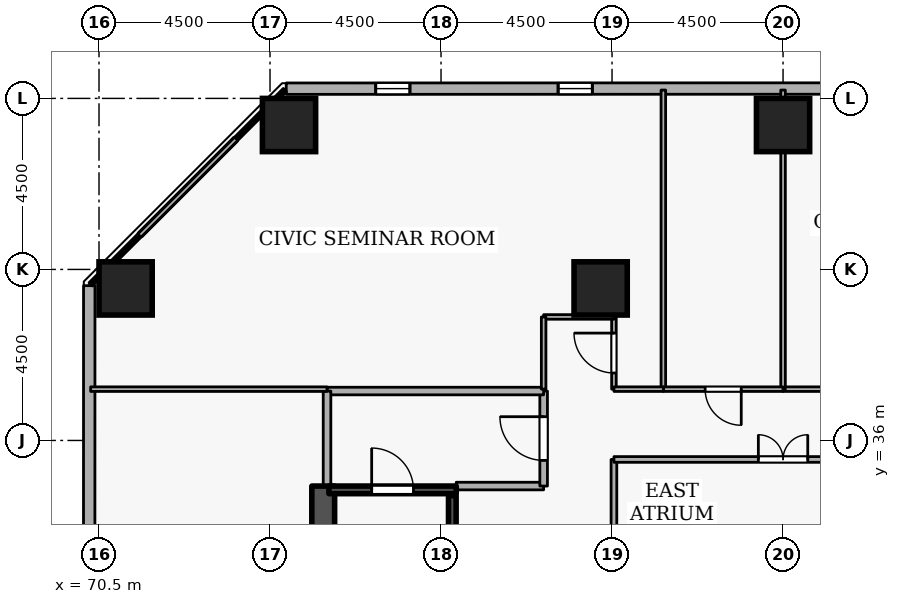
"""IFC4 building model, lengths in metres.
Left out: names, types, materials, properties, quantities, classifications, styles, units other than length and angle.
Written with IfcOpenShell. Run it as: python <this file> out.ifc"""

import sys

from ifc_helpers import new_model, si_unit, direction, frame, frame_2d, origin, origin_2d, place, context, subcontext, project, spatial, rectangle, extrude, element, fill, save


model = new_model("IFC4")
c1 = context("Model", 3, precision=1e-05, world=origin(), true_north=direction((0.0, 1.0)))
c2 = subcontext(c1, "Body", "Model", "MODEL_VIEW")
j1 = project(units=[si_unit("LENGTHUNIT", "METRE"), si_unit("PLANEANGLEUNIT", "RADIAN")], contexts=[c1])
p1 = place(None, origin())
s1 = spatial("IfcSite", under=j1, at=p1, CompositionType="ELEMENT")
p2 = place(p1, origin())
s2 = spatial("IfcBuilding", under=s1, at=p2, CompositionType="ELEMENT")
p3 = place(p2, frame((0.0, 0.0, 38.7)))
s3 = spatial("IfcBuildingStorey", under=s2, at=p3, CompositionType="ELEMENT", Elevation=38.7)
p4 = place(p3, frame((76.4, 19.2, 0.0), z_axis=(0.0, 0.0, 1.0), x_axis=(0.0, 1.0, 0.0)))
e1 = element("IfcWall", 1, at=p4, inside=s3, PredefinedType="SHEAR", context=c2, shape_type="SweptSolid", body=[
    extrude(rectangle(XDim=15.6, YDim=0.6, at=frame_2d((7.8, 0.0))), origin(), (0.0, 0.0, 1.0), 3.6),
])
for number, where, z_axis, x_axis in (
    (2, (88.5, 44.3, 0.0), (0.0, 0.0, 1.0), (1.0, 0.0, 0.0)),
    (3, (75.5, 44.3, 0.0), (0.0, 0.0, 1.0), (1.0, 0.0, 0.0)),
    (4, (71.2, 40.0, 0.0), (0.0, 0.0, 1.0), (1.0, 0.0, 0.0)),
    (5, (83.7, 40.0, 0.0), (0.0, 0.0, 1.0), (1.0, 0.0, 0.0)),
):
    element("IfcColumn", number, at=place(p3, frame(where, z_axis=z_axis, x_axis=x_axis)), inside=s3, PredefinedType="COLUMN", context=c2, shape_type="SweptSolid", body=[
        extrude(rectangle(XDim=1.4, YDim=1.4, at=origin_2d()), origin(), (0.0, 0.0, 1.0), 3.6),
    ])
p5 = place(p3, frame((110.181, 45.265, 0.0), z_axis=(0.0, 0.0, 1.0), x_axis=(-0.999999969775, -0.000245864205, 0.0)))
e6 = element("IfcWall", 6, at=p5, inside=s3, PredefinedType="STANDARD", context=c2, shape_type="SweptSolid", body=[
    extrude(rectangle(XDim=34.755, YDim=0.3, at=frame_2d((17.377, 0.0))), origin(), (0.0, 0.0, 1.0), 2.7),
])
p6 = place(p5, frame((2.7, 0.0, 0.72)))
e7 = element("IfcOpeningElement", 7, at=p6, cuts=e6, PredefinedType="OPENING", context=c2, shape_type="SweptSolid", body=[
    extrude(rectangle(XDim=0.9, YDim=1.75, at=frame_2d((0.45, 0.875))), frame((0.0, 0.16, 0.0), z_axis=(0.0, -1.0, 0.0), x_axis=(1.0, 0.0, 0.0)), (0.0, 0.0, 1.0), 0.32),
])
p7 = place(p5, frame((12.3, 0.0, 0.72)))
e8 = element("IfcOpeningElement", 8, at=p7, cuts=e6, PredefinedType="OPENING", context=c2, shape_type="SweptSolid", body=[
    extrude(rectangle(XDim=0.9, YDim=1.75, at=frame_2d((0.45, 0.875))), frame((0.0, 0.16, 0.0), z_axis=(0.0, -1.0, 0.0), x_axis=(1.0, 0.0, 0.0)), (0.0, 0.0, 1.0), 0.32),
])
p8 = place(p5, frame((17.1, 0.0, 0.72)))
e9 = element("IfcOpeningElement", 9, at=p8, cuts=e6, PredefinedType="OPENING", context=c2, shape_type="SweptSolid", body=[
    extrude(rectangle(XDim=0.9, YDim=1.75, at=frame_2d((0.45, 0.875))), frame((0.0, 0.16, 0.0), z_axis=(0.0, -1.0, 0.0), x_axis=(1.0, 0.0, 0.0)), (0.0, 0.0, 1.0), 0.32),
])
p9 = place(p5, frame((26.7, 0.0, 0.72)))
e10 = element("IfcOpeningElement", 10, at=p9, cuts=e6, PredefinedType="OPENING", context=c2, shape_type="SweptSolid", body=[
    extrude(rectangle(XDim=0.9, YDim=1.75, at=frame_2d((0.45, 0.875))), frame((0.0, 0.16, 0.0), z_axis=(0.0, -1.0, 0.0), x_axis=(1.0, 0.0, 0.0)), (0.0, 0.0, 1.0), 0.32),
])
p10 = place(p5, frame((31.5, 0.0, 0.72)))
e11 = element("IfcOpeningElement", 11, at=p10, cuts=e6, PredefinedType="OPENING", context=c2, shape_type="SweptSolid", body=[
    extrude(rectangle(XDim=0.9, YDim=1.75, at=frame_2d((0.45, 0.875))), frame((0.0, 0.16, 0.0), z_axis=(0.0, -1.0, 0.0), x_axis=(1.0, 0.0, 0.0)), (0.0, 0.0, 1.0), 0.32),
])
p11 = place(p3, frame((70.244, 40.073, 0.0), z_axis=(0.0, 0.0, 1.0), x_axis=(-0.000245864205, -0.999999969775, 0.0)))
e12 = element("IfcWall", 12, at=p11, inside=s3, PredefinedType="STANDARD", context=c2, shape_type="SweptSolid", body=[
    extrude(rectangle(XDim=34.755, YDim=0.3, at=frame_2d((17.377, 0.0))), origin(), (0.0, 0.0, 1.0), 2.7),
])
p12 = place(p11, frame((7.5, 0.0, 0.72)))
e13 = element("IfcOpeningElement", 13, at=p12, cuts=e12, PredefinedType="OPENING", context=c2, shape_type="SweptSolid", body=[
    extrude(rectangle(XDim=0.9, YDim=1.75, at=frame_2d((0.45, 0.875))), frame((0.0, 0.16, 0.0), z_axis=(0.0, -1.0, 0.0), x_axis=(1.0, 0.0, 0.0)), (0.0, 0.0, 1.0), 0.32),
])
p13 = place(p11, frame((17.1, 0.0, 0.72)))
e14 = element("IfcOpeningElement", 14, at=p13, cuts=e12, PredefinedType="OPENING", context=c2, shape_type="SweptSolid", body=[
    extrude(rectangle(XDim=0.9, YDim=1.75, at=frame_2d((0.45, 0.875))), frame((0.0, 0.16, 0.0), z_axis=(0.0, -1.0, 0.0), x_axis=(1.0, 0.0, 0.0)), (0.0, 0.0, 1.0), 0.32),
])
p14 = place(p11, frame((21.9, 0.0, 0.72)))
e15 = element("IfcOpeningElement", 15, at=p14, cuts=e12, PredefinedType="OPENING", context=c2, shape_type="SweptSolid", body=[
    extrude(rectangle(XDim=0.9, YDim=1.75, at=frame_2d((0.45, 0.875))), frame((0.0, 0.16, 0.0), z_axis=(0.0, -1.0, 0.0), x_axis=(1.0, 0.0, 0.0)), (0.0, 0.0, 1.0), 0.32),
])
p15 = place(p11, frame((31.5, 0.0, 0.72)))
e16 = element("IfcOpeningElement", 16, at=p15, cuts=e12, PredefinedType="OPENING", context=c2, shape_type="SweptSolid", body=[
    extrude(rectangle(XDim=0.9, YDim=1.75, at=frame_2d((0.45, 0.875))), frame((0.0, 0.16, 0.0), z_axis=(0.0, -1.0, 0.0), x_axis=(1.0, 0.0, 0.0)), (0.0, 0.0, 1.0), 0.32),
])
p16 = place(p3, frame((76.55, 34.7, 0.0), z_axis=(0.0, 0.0, 1.0), x_axis=(1.0, 0.0, 0.0)))
e17 = element("IfcWall", 17, at=p16, inside=s3, PredefinedType="SHEAR", context=c2, shape_type="SweptSolid", body=[
    extrude(rectangle(XDim=3.35, YDim=0.2, at=frame_2d((1.675, 0.0))), origin(), (0.0, 0.0, 1.0), 3.6),
])
p17 = place(p16, frame((1.125, 0.0, 0.0)))
e18 = element("IfcOpeningElement", 18, at=p17, cuts=e17, PredefinedType="OPENING", context=c2, shape_type="SweptSolid", body=[
    extrude(rectangle(XDim=1.1, YDim=2.1, at=frame_2d((0.55, 1.05))), frame((0.0, 0.11, 0.0), z_axis=(0.0, -1.0, 0.0), x_axis=(1.0, 0.0, 0.0)), (0.0, 0.0, 1.0), 0.22),
])
p18 = place(p3, frame((79.797, 27.45, 0.0), z_axis=(0.0, 0.0, 1.0), x_axis=(0.0, 1.0, 0.0)))
e19 = element("IfcWall", 19, at=p18, inside=s3, PredefinedType="SHEAR", context=c2, shape_type="SweptSolid", body=[
    extrude(rectangle(XDim=7.1, YDim=0.2, at=frame_2d((3.55, 0.0))), origin(), (0.0, 0.0, 1.0), 3.6),
])
p19 = place(p3, frame((79.9, 34.8, 0.0), z_axis=(0.0, 0.0, 1.0), x_axis=(1.0, 0.0, 0.0)))
e20 = element("IfcWall", 20, at=p19, inside=s3, PredefinedType="STANDARD", context=c2, shape_type="SweptSolid", body=[
    extrude(rectangle(XDim=2.3, YDim=0.2, at=frame_2d((1.15, 0.0))), origin(), (0.0, 0.0, 1.0), 2.545),
])
p20 = place(p3, frame((82.2, 34.8, 0.0), z_axis=(0.0, 0.0, 1.0), x_axis=(0.0, 1.0, 0.0)))
e21 = element("IfcWall", 21, at=p20, inside=s3, PredefinedType="STANDARD", context=c2, shape_type="SweptSolid", body=[
    extrude(rectangle(XDim=2.5, YDim=0.2, at=frame_2d((1.25, 0.0))), origin(), (0.0, 0.0, 1.0), 3.34),
])
p21 = place(p20, frame((0.675, 0.0, 0.0)))
e22 = element("IfcOpeningElement", 22, at=p21, cuts=e21, PredefinedType="OPENING", context=c2, shape_type="SweptSolid", body=[
    extrude(rectangle(XDim=1.15, YDim=2.1, at=frame_2d((0.575, 1.05))), frame((0.0, 0.11, 0.0), z_axis=(0.0, -1.0, 0.0), x_axis=(1.0, 0.0, 0.0)), (0.0, 0.0, 1.0), 0.22),
])
p22 = place(p3, frame((82.2, 37.3, 0.0), z_axis=(0.0, 0.0, 1.0), x_axis=(-1.0, 0.0, 0.0)))
e23 = element("IfcWall", 23, at=p22, inside=s3, PredefinedType="STANDARD", context=c2, shape_type="SweptSolid", body=[
    extrude(rectangle(XDim=5.7, YDim=0.2, at=frame_2d((2.85, 0.0))), origin(), (0.0, 0.0, 1.0), 3.34),
])
p23 = place(p3, frame((76.5, 37.3, 0.0), z_axis=(0.0, 0.0, 1.0), x_axis=(0.0, -1.0, 0.0)))
e24 = element("IfcWall", 24, at=p23, inside=s3, PredefinedType="STANDARD", context=c2, shape_type="SweptSolid", body=[
    extrude(rectangle(XDim=2.5, YDim=0.2, at=frame_2d((1.25, 0.0))), origin(), (0.0, 0.0, 1.0), 3.34),
])
p24 = place(p3, frame((92.95, 37.35, 0.0), z_axis=(0.0, 0.0, 1.0), x_axis=(-1.0, 0.0, 0.0)))
e25 = element("IfcWall", 25, at=p24, inside=s3, PredefinedType="PARTITIONING", context=c2, shape_type="SweptSolid", body=[
    extrude(rectangle(XDim=4.45, YDim=0.12, at=frame_2d((2.225, 0.0))), origin(), (0.0, 0.0, 1.0), 3.34),
])
p25 = place(p24, frame((1.7, 0.0, 0.0)))
e26 = element("IfcOpeningElement", 26, at=p25, cuts=e25, PredefinedType="OPENING", context=c2, shape_type="SweptSolid", body=[
    extrude(rectangle(XDim=1.05, YDim=2.1, at=frame_2d((0.525, 1.05))), frame((0.0, 0.07, 0.0), z_axis=(0.0, -1.0, 0.0), x_axis=(1.0, 0.0, 0.0)), (0.0, 0.0, 1.0), 0.14),
])
p26 = place(p3, frame((88.5, 37.35, 0.0), z_axis=(0.0, 0.0, 1.0), x_axis=(0.0, 1.0, 0.0)))
e27 = element("IfcWall", 27, at=p26, inside=s3, PredefinedType="PARTITIONING", context=c2, shape_type="SweptSolid", body=[
    extrude(rectangle(XDim=7.87, YDim=0.12, at=frame_2d((3.935, 0.0))), origin(), (0.0, 0.0, 1.0), 2.882),
])
p27 = place(p3, frame((85.35, 37.35, 0.0), z_axis=(0.0, 0.0, 1.0), x_axis=(0.0, 1.0, 0.0)))
e28 = element("IfcWall", 28, at=p27, inside=s3, PredefinedType="PARTITIONING", context=c2, shape_type="SweptSolid", body=[
    extrude(rectangle(XDim=7.87, YDim=0.12, at=frame_2d((3.935, 0.0))), origin(), (0.0, 0.0, 1.0), 3.34),
])
p28 = place(p3, frame((88.5, 37.35, 0.0), z_axis=(0.0, 0.0, 1.0), x_axis=(-1.0, 0.0, 0.0)))
e29 = element("IfcWall", 29, at=p28, inside=s3, PredefinedType="PARTITIONING", context=c2, shape_type="SweptSolid", body=[
    extrude(rectangle(XDim=3.15, YDim=0.12, at=frame_2d((1.575, 0.0))), origin(), (0.0, 0.0, 1.0), 3.34),
])
p29 = place(p28, frame((1.1, 0.0, 0.0)))
e30 = element("IfcOpeningElement", 30, at=p29, cuts=e29, PredefinedType="OPENING", context=c2, shape_type="SweptSolid", body=[
    extrude(rectangle(XDim=0.95, YDim=2.1, at=frame_2d((0.475, 1.05))), frame((0.0, 0.07, 0.0), z_axis=(0.0, -1.0, 0.0), x_axis=(1.0, 0.0, 0.0)), (0.0, 0.0, 1.0), 0.14),
])
p30 = place(p3, frame((84.05, 37.35, 0.0), z_axis=(0.0, 0.0, 1.0), x_axis=(0.0, 1.0, 0.0)))
e31 = element("IfcWall", 31, at=p30, inside=s3, PredefinedType="PARTITIONING", context=c2, shape_type="SweptSolid", body=[
    extrude(rectangle(XDim=1.9, YDim=0.12, at=frame_2d((0.95, 0.0))), origin(), (0.0, 0.0, 1.0), 3.34),
])
p31 = place(p30, frame((0.425, 0.0, 0.0)))
e32 = element("IfcOpeningElement", 32, at=p31, cuts=e31, PredefinedType="OPENING", context=c2, shape_type="SweptSolid", body=[
    extrude(rectangle(XDim=1.05, YDim=2.1, at=frame_2d((0.525, 1.05))), frame((0.0, 0.07, 0.0), z_axis=(0.0, -1.0, 0.0), x_axis=(1.0, 0.0, 0.0)), (0.0, 0.0, 1.0), 0.14),
])
p32 = place(p3, frame((84.05, 39.25, 0.0), z_axis=(0.0, 0.0, 1.0), x_axis=(-1.0, 0.0, 0.0)))
e33 = element("IfcWall", 33, at=p32, inside=s3, PredefinedType="PARTITIONING", context=c2, shape_type="SweptSolid", body=[
    extrude(rectangle(XDim=1.85, YDim=0.12, at=frame_2d((0.925, 0.0))), origin(), (0.0, 0.0, 1.0), 3.34),
])
p33 = place(p3, frame((82.2, 39.25, 0.0), z_axis=(0.0, 0.0, 1.0), x_axis=(0.0, -1.0, 0.0)))
e34 = element("IfcWall", 34, at=p33, inside=s3, PredefinedType="PARTITIONING", context=c2, shape_type="SweptSolid", body=[
    extrude(rectangle(XDim=1.9, YDim=0.12, at=frame_2d((0.95, 0.0))), origin(), (0.0, 0.0, 1.0), 3.34),
])
p34 = place(p3, frame((76.5, 37.35, 0.0), z_axis=(0.0, 0.0, 1.0), x_axis=(-1.0, 0.0, 0.0)))
e35 = element("IfcWall", 35, at=p34, inside=s3, PredefinedType="PARTITIONING", context=c2, shape_type="SweptSolid", body=[
    extrude(rectangle(XDim=6.22, YDim=0.12, at=frame_2d((3.11, 0.0))), origin(), (0.0, 0.0, 1.0), 3.34),
])
p35 = place(p3, frame((70.28, 40.107, 0.0), z_axis=(0.0, 0.0, 1.0), x_axis=(0.707106781187, 0.707106781187, 0.0)))
e36 = element("IfcWall", 36, at=p35, inside=s3, PredefinedType="PARTITIONING", context=c2, shape_type="SweptSolid", body=[
    extrude(rectangle(XDim=7.23, YDim=0.12, at=frame_2d((3.615, 0.0))), origin(), (0.0, 0.0, 1.0), 3.34),
])
p36 = place(p3, frame((85.35, 37.35, 0.0), z_axis=(0.0, 0.0, 1.0), x_axis=(-1.0, 0.0, 0.0)))
e37 = element("IfcWall", 37, at=p36, inside=s3, PredefinedType="PARTITIONING", context=c2, shape_type="SweptSolid", body=[
    extrude(rectangle(XDim=1.3, YDim=0.12, at=frame_2d((0.65, 0.0))), origin(), (0.0, 0.0, 1.0), 3.34),
])
p37 = place(p3, frame((84.05, 32.2, 0.0), z_axis=(0.0, 0.0, 1.0), x_axis=(0.0, 1.0, 0.0)))
e38 = element("IfcWall", 38, at=p37, inside=s3, PredefinedType="PARTITIONING", context=c2, shape_type="SweptSolid", body=[
    extrude(rectangle(XDim=3.3, YDim=0.15, at=frame_2d((1.65, 0.0))), origin(), (0.0, 0.0, 1.0), 3.34),
])
p38 = place(p3, frame((84.05, 35.5, 0.0), z_axis=(0.0, 0.0, 1.0), x_axis=(1.0, 0.0, 0.0)))
e39 = element("IfcWall", 39, at=p38, inside=s3, PredefinedType="PARTITIONING", context=c2, shape_type="SweptSolid", body=[
    extrude(rectangle(XDim=8.9, YDim=0.15, at=frame_2d((4.45, 0.0))), origin(), (0.0, 0.0, 1.0), 3.34),
])
p39 = place(p38, frame((3.8, 0.0, 0.0)))
e40 = element("IfcOpeningElement", 40, at=p39, cuts=e39, PredefinedType="OPENING", context=c2, shape_type="SweptSolid", body=[
    extrude(rectangle(XDim=1.3, YDim=2.12, at=frame_2d((0.65, 1.06))), frame((0.0, 0.085, 0.0), z_axis=(0.0, -1.0, 0.0), x_axis=(1.0, 0.0, 0.0)), (0.0, 0.0, 1.0), 0.17),
])
p40 = place(p9, origin())
e41 = element("IfcWindow", 41, at=p40, inside=s3, PartitioningType="SINGLE_PANEL", PredefinedType="WINDOW", context=c2, shape_type="SweptSolid", body=[
    extrude(rectangle(XDim=0.9, YDim=1.75, at=frame_2d((0.45, 0.875))), frame((0.0, 0.03, 0.0), z_axis=(0.0, -1.0, 0.0), x_axis=(1.0, 0.0, 0.0)), (0.0, 0.0, 1.0), 0.06),
])
fill(e10, e41)
p41 = place(p10, origin())
e42 = element("IfcWindow", 42, at=p41, inside=s3, PartitioningType="SINGLE_PANEL", PredefinedType="WINDOW", context=c2, shape_type="SweptSolid", body=[
    extrude(rectangle(XDim=0.9, YDim=1.75, at=frame_2d((0.45, 0.875))), frame((0.0, 0.03, 0.0), z_axis=(0.0, -1.0, 0.0), x_axis=(1.0, 0.0, 0.0)), (0.0, 0.0, 1.0), 0.06),
])
fill(e11, e42)
p42 = place(p17, origin())
e43 = element("IfcDoor", 43, at=p42, inside=s3, OperationType="SINGLE_SWING_LEFT", PredefinedType="DOOR", context=c2, shape_type="SweptSolid", body=[
    extrude(rectangle(XDim=1.1, YDim=2.1, at=frame_2d((0.55, 1.05))), frame((0.0, 0.025, 0.0), z_axis=(0.0, -1.0, 0.0), x_axis=(1.0, 0.0, 0.0)), (0.0, 0.0, 1.0), 0.05),
])
fill(e18, e43)
p43 = place(p21, origin())
e44 = element("IfcDoor", 44, at=p43, inside=s3, OperationType="SINGLE_SWING_RIGHT", PredefinedType="DOOR", context=c2, shape_type="SweptSolid", body=[
    extrude(rectangle(XDim=1.15, YDim=2.1, at=frame_2d((0.575, 1.05))), frame((0.0, 0.025, 0.0), z_axis=(0.0, -1.0, 0.0), x_axis=(1.0, 0.0, 0.0)), (0.0, 0.0, 1.0), 0.05),
])
fill(e22, e44)
p44 = place(p29, origin())
e45 = element("IfcDoor", 45, at=p44, inside=s3, OperationType="SINGLE_SWING_LEFT", PredefinedType="DOOR", context=c2, shape_type="SweptSolid", body=[
    extrude(rectangle(XDim=0.95, YDim=2.1, at=frame_2d((0.475, 1.05))), frame((0.0, 0.025, 0.0), z_axis=(0.0, -1.0, 0.0), x_axis=(1.0, 0.0, 0.0)), (0.0, 0.0, 1.0), 0.05),
])
fill(e30, e45)
p45 = place(p31, origin())
e46 = element("IfcDoor", 46, at=p45, inside=s3, OperationType="SINGLE_SWING_RIGHT", PredefinedType="DOOR", context=c2, shape_type="SweptSolid", body=[
    extrude(rectangle(XDim=1.05, YDim=2.1, at=frame_2d((0.525, 1.05))), frame((0.0, 0.025, 0.0), z_axis=(0.0, -1.0, 0.0), x_axis=(1.0, 0.0, 0.0)), (0.0, 0.0, 1.0), 0.05),
])
fill(e32, e46)
p46 = place(p39, origin())
e47 = element("IfcDoor", 47, at=p46, inside=s3, OperationType="DOUBLE_DOOR_SINGLE_SWING", PredefinedType="DOOR", context=c2, shape_type="SweptSolid", body=[
    extrude(rectangle(XDim=1.3, YDim=2.12, at=frame_2d((0.65, 1.06))), frame((0.0, 0.025, 0.0), z_axis=(0.0, -1.0, 0.0), x_axis=(1.0, 0.0, 0.0)), (0.0, 0.0, 1.0), 0.05),
])
fill(e40, e47)
save(model, sys.argv[1])
